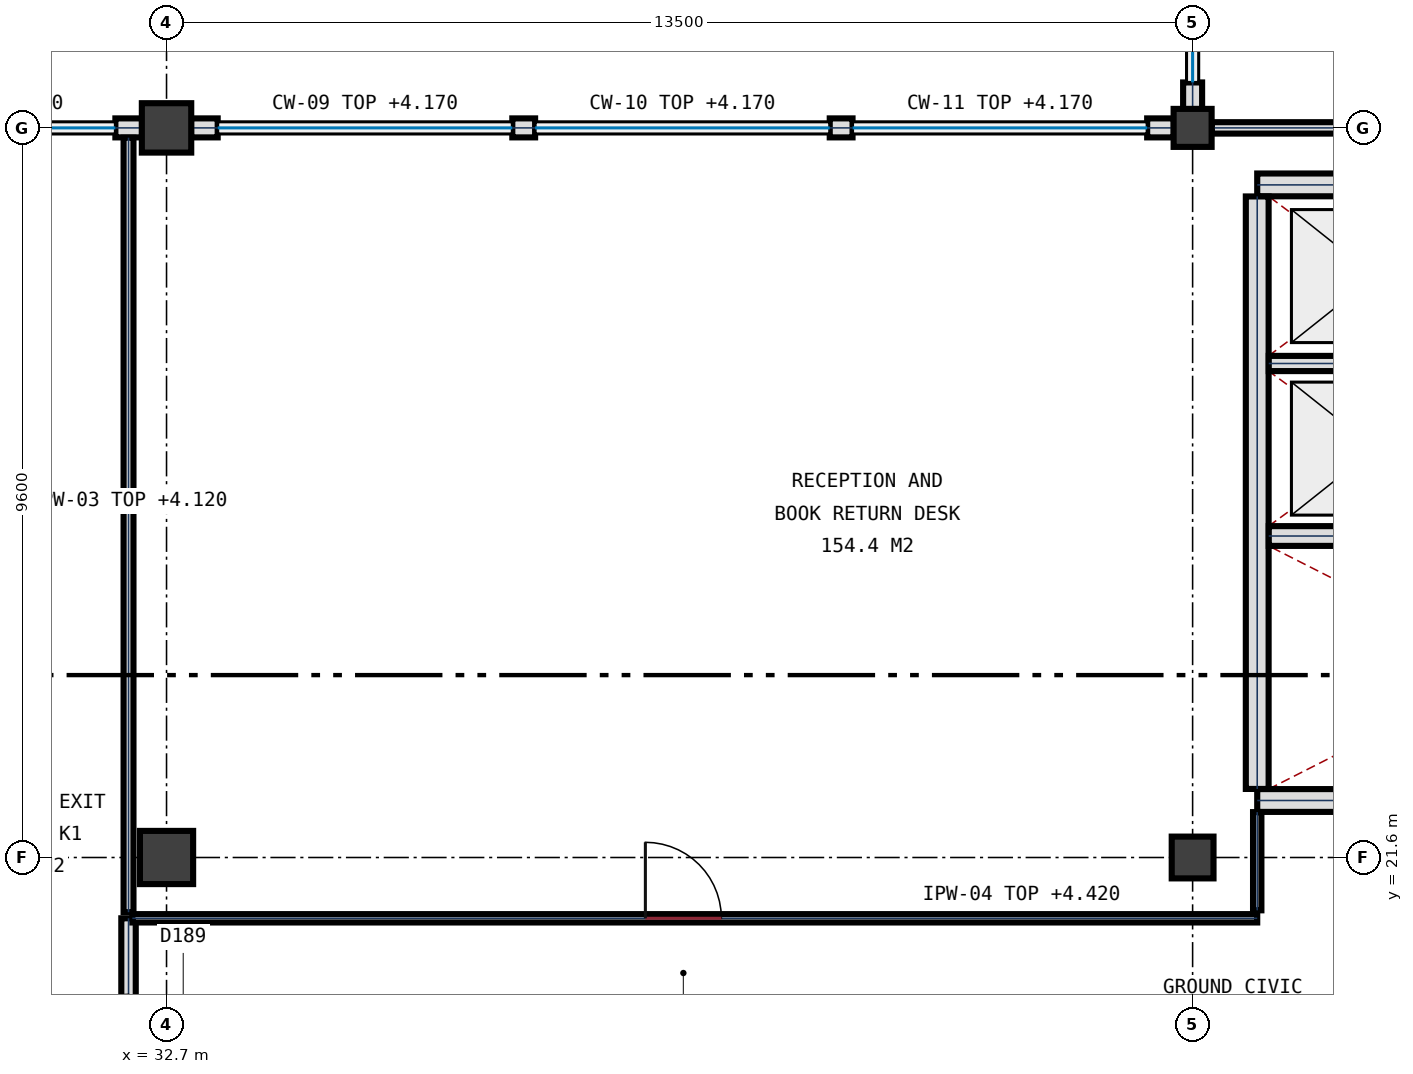
"""IFC4 building model, lengths in metres.
Left out: names, types, materials, properties, quantities, classifications, styles, units other than length and angle.
Written with IfcOpenShell. Run it as: python <this file> out.ifc"""

import sys

from ifc_helpers import new_model, si_unit, direction, frame, frame_2d, origin, origin_2d, place, context, subcontext, project, spatial, rectangle, extrude, element, fill, save


model = new_model("IFC4")
c1 = context("Model", 3, precision=1e-05, world=origin(), true_north=direction((0.0, 1.0)))
c2 = subcontext(c1, "Body", "Model", "MODEL_VIEW")
j1 = project(units=[si_unit("LENGTHUNIT", "METRE"), si_unit("PLANEANGLEUNIT", "RADIAN")], contexts=[c1])
p1 = place(None, origin())
s1 = spatial("IfcSite", under=j1, at=p1, CompositionType="ELEMENT")
p2 = place(p1, origin())
s2 = spatial("IfcBuilding", under=s1, at=p2, CompositionType="ELEMENT")
p3 = place(p2, origin())
s3 = spatial("IfcBuildingStorey", under=s2, at=p3, CompositionType="ELEMENT", Elevation=0.0)
p4 = place(p3, frame((32.7, 21.6, 0.0), z_axis=(0.0, 0.0, 1.0), x_axis=(1.0, 0.0, 0.0)))
e1 = element("IfcColumn", 1, at=p4, inside=s3, PredefinedType="COLUMN", context=c2, shape_type="SweptSolid", body=[
    extrude(rectangle(XDim=0.7, YDim=0.7, at=origin_2d()), origin(), (0.0, 0.0, 1.0), 5.4),
])
p5 = place(p3, frame((32.7, 31.2, 0.0), z_axis=(0.0, 0.0, 1.0), x_axis=(1.0, 0.0, 0.0)))
e2 = element("IfcColumn", 2, at=p5, inside=s3, PredefinedType="COLUMN", context=c2, shape_type="SweptSolid", body=[
    extrude(rectangle(XDim=0.65, YDim=0.65, at=origin_2d()), origin(), (0.0, 0.0, 1.0), 5.4),
])
p6 = place(p3, frame((46.2, 21.6, 0.0), z_axis=(0.0, 0.0, 1.0), x_axis=(1.0, 0.0, 0.0)))
e3 = element("IfcColumn", 3, at=p6, inside=s3, PredefinedType="COLUMN", context=c2, shape_type="SweptSolid", body=[
    extrude(rectangle(XDim=0.55, YDim=0.55, at=origin_2d()), origin(), (0.0, 0.0, 1.0), 5.4),
])
p7 = place(p3, frame((46.2, 31.2, 0.0), z_axis=(0.0, 0.0, 1.0), x_axis=(1.0, 0.0, 0.0)))
e4 = element("IfcColumn", 4, at=p7, inside=s3, PredefinedType="COLUMN", context=c2, shape_type="SweptSolid", body=[
    extrude(rectangle(XDim=0.5, YDim=0.5, at=origin_2d()), origin(), (0.0, 0.0, 1.0), 5.4),
])
p8 = place(p3, frame((32.027, 31.2, 0.0), z_axis=(0.0, 0.0, 1.0), x_axis=(1.0, 0.0, 0.0)))
e5 = element("IfcWall", 5, at=p8, inside=s3, PredefinedType="SOLIDWALL", context=c2, shape_type="SweptSolid", body=[
    extrude(rectangle(XDim=0.35, YDim=0.25, at=frame_2d((0.175, 0.0))), origin(), (0.0, 0.0, 1.0), 4.07),
])
p9 = place(p3, frame((33.023, 31.2, 0.0), z_axis=(0.0, 0.0, 1.0), x_axis=(1.0, 0.0, 0.0)))
e6 = element("IfcWall", 6, at=p9, inside=s3, PredefinedType="SOLIDWALL", context=c2, shape_type="SweptSolid", body=[
    extrude(rectangle(XDim=0.35, YDim=0.25, at=frame_2d((0.175, 0.0))), origin(), (0.0, 0.0, 1.0), 4.17),
])
p10 = place(p3, frame((45.602, 31.2, 0.0), z_axis=(0.0, 0.0, 1.0), x_axis=(1.0, 0.0, 0.0)))
e7 = element("IfcWall", 7, at=p10, inside=s3, PredefinedType="SOLIDWALL", context=c2, shape_type="SweptSolid", body=[
    extrude(rectangle(XDim=0.35, YDim=0.25, at=frame_2d((0.175, 0.0))), origin(), (0.0, 0.0, 1.0), 4.17),
])
p11 = place(p3, frame((37.249, 31.2, 0.0), z_axis=(0.0, 0.0, 1.0), x_axis=(1.0, 0.0, 0.0)))
e8 = element("IfcWall", 8, at=p11, inside=s3, PredefinedType="SOLIDWALL", context=c2, shape_type="SweptSolid", body=[
    extrude(rectangle(XDim=0.3, YDim=0.25, at=frame_2d((0.15, 0.0))), origin(), (0.0, 0.0, 1.0), 4.17),
])
p12 = place(p3, frame((41.426, 31.2, 0.0), z_axis=(0.0, 0.0, 1.0), x_axis=(1.0, 0.0, 0.0)))
e9 = element("IfcWall", 9, at=p12, inside=s3, PredefinedType="SOLIDWALL", context=c2, shape_type="SweptSolid", body=[
    extrude(rectangle(XDim=0.3, YDim=0.25, at=frame_2d((0.15, 0.0))), origin(), (0.0, 0.0, 1.0), 4.17),
])
p13 = place(p3, frame((46.2, 31.448, 0.0), z_axis=(0.0, 0.0, 1.0), x_axis=(0.0, 1.0, 0.0)))
e10 = element("IfcWall", 10, at=p13, inside=s3, PredefinedType="SOLIDWALL", context=c2, shape_type="SweptSolid", body=[
    extrude(rectangle(XDim=0.35, YDim=0.25, at=frame_2d((0.175, 0.0))), origin(), (0.0, 0.0, 1.0), 4.22),
])
for number, where, z_axis, x_axis in (
    (11, (56.55, 22.35, 0.0), (0.0, 0.0, 1.0), (-1.0, 0.0, 0.0)),
    (12, (47.05, 30.45, 0.0), (0.0, 0.0, 1.0), (1.0, 0.0, 0.0)),
):
    element("IfcWall", number, at=place(p3, frame(where, z_axis=z_axis, x_axis=x_axis)), inside=s3, PredefinedType="SHEAR", context=c2, shape_type="SweptSolid", body=[
        extrude(rectangle(XDim=9.5, YDim=0.3, at=frame_2d((4.75, 0.0))), origin(), (0.0, 0.0, 1.0), 5.4),
    ])
p14 = place(p3, frame((47.05, 22.502, 0.0), z_axis=(0.0, 0.0, 1.0), x_axis=(0.0, 1.0, 0.0)))
e13 = element("IfcWall", 13, at=p14, inside=s3, PredefinedType="SHEAR", context=c2, shape_type="SweptSolid", body=[
    extrude(rectangle(XDim=7.796, YDim=0.3, at=frame_2d((3.898, 0.0))), origin(), (0.0, 0.0, 1.0), 5.4),
])
p15 = place(p3, frame((47.202, 25.83, 0.0), z_axis=(0.0, 0.0, 1.0), x_axis=(1.0, 0.0, 0.0)))
e14 = element("IfcWall", 14, at=p15, inside=s3, PredefinedType="SHEAR", context=c2, shape_type="SweptSolid", body=[
    extrude(rectangle(XDim=9.196, YDim=0.26, at=frame_2d((4.598, 0.0))), origin(), (0.0, 0.0, 1.0), 5.4),
])
p16 = place(p15, frame((6.398, 0.0, 0.0)))
e15 = element("IfcOpeningElement", 15, at=p16, cuts=e14, PredefinedType="OPENING", context=c2, shape_type="SweptSolid", body=[
    extrude(rectangle(XDim=1.2, YDim=2.2, at=frame_2d((0.6, 1.1))), frame((0.0, 0.14, 0.0), z_axis=(0.0, -1.0, 0.0), x_axis=(1.0, 0.0, 0.0)), (0.0, 0.0, 1.0), 0.28),
])
p17 = place(p15, frame((8.203, 0.0, 0.0)))
e16 = element("IfcOpeningElement", 16, at=p17, cuts=e14, PredefinedType="OPENING", context=c2, shape_type="SweptSolid", body=[
    extrude(rectangle(XDim=0.85, YDim=2.05, at=frame_2d((0.425, 1.025))), frame((0.0, 0.14, 0.0), z_axis=(0.0, -1.0, 0.0), x_axis=(1.0, 0.0, 0.0)), (0.0, 0.0, 1.0), 0.28),
])
p18 = place(p3, frame((47.202, 28.1, 0.0), z_axis=(0.0, 0.0, 1.0), x_axis=(1.0, 0.0, 0.0)))
e17 = element("IfcWall", 17, at=p18, inside=s3, PredefinedType="PLUMBINGWALL", context=c2, shape_type="SweptSolid", body=[
    extrude(rectangle(XDim=2.796, YDim=0.2, at=frame_2d((1.398, 0.0))), origin(), (0.0, 0.0, 1.0), 5.08),
])
p19 = place(p3, frame((32.2, 17.6, 0.0), z_axis=(0.0, 0.0, 1.0), x_axis=(0.0, 1.0, 0.0)))
e18 = element("IfcWall", 18, at=p19, inside=s3, PredefinedType="PARTITIONING", context=c2, shape_type="SweptSolid", body=[
    extrude(rectangle(XDim=3.2, YDim=0.19, at=frame_2d((1.6, 0.0))), origin(), (0.0, 0.0, 1.0), 5.08),
])
p20 = place(p19, frame((1.0, 0.0, 0.0)))
e19 = element("IfcOpeningElement", 19, at=p20, cuts=e18, PredefinedType="OPENING", context=c2, shape_type="SweptSolid", body=[
    extrude(rectangle(XDim=1.2, YDim=2.2, at=frame_2d((0.6, 1.1))), frame((0.0, 0.105, 0.0), z_axis=(0.0, -1.0, 0.0), x_axis=(1.0, 0.0, 0.0)), (0.0, 0.0, 1.0), 0.21),
])
p21 = place(p3, frame((46.453, 31.2, 0.0), z_axis=(0.0, 0.0, 1.0), x_axis=(1.0, 0.0, 0.0)))
e20 = element("IfcWall", 20, at=p21, inside=s3, PredefinedType="PARTITIONING", context=c2, shape_type="SweptSolid", body=[
    extrude(rectangle(XDim=10.097, YDim=0.15, at=frame_2d((5.049, 0.0))), origin(), (0.0, 0.0, 1.0), 4.22),
])
p22 = place(p3, frame((32.25, 20.8, 0.0), z_axis=(0.0, 0.0, 1.0), x_axis=(1.0, 0.0, 0.0)))
e21 = element("IfcWall", 21, at=p22, inside=s3, PredefinedType="PARTITIONING", context=c2, shape_type="SweptSolid", body=[
    extrude(rectangle(XDim=14.8, YDim=0.11, at=frame_2d((7.4, 0.0))), origin(), (0.0, 0.0, 1.0), 4.42),
])
p23 = place(p22, frame((6.75, 0.0, 0.0)))
e22 = element("IfcOpeningElement", 22, at=p23, cuts=e21, PredefinedType="OPENING", context=c2, shape_type="SweptSolid", body=[
    extrude(rectangle(XDim=1.0, YDim=2.2, at=frame_2d((0.5, 1.1))), frame((0.0, 0.065, 0.0), z_axis=(0.0, -1.0, 0.0), x_axis=(1.0, 0.0, 0.0)), (0.0, 0.0, 1.0), 0.13),
])
p24 = place(p3, frame((32.2, 20.88, 0.0), z_axis=(0.0, 0.0, 1.0), x_axis=(0.0, 1.0, 0.0)))
e23 = element("IfcWall", 23, at=p24, inside=s3, PredefinedType="PARTITIONING", context=c2, shape_type="SweptSolid", body=[
    extrude(rectangle(XDim=10.191, YDim=0.13, at=frame_2d((5.096, 0.0))), origin(), (0.0, 0.0, 1.0), 4.12),
])
p25 = place(p3, frame((47.05, 20.905, 0.0), z_axis=(0.0, 0.0, 1.0), x_axis=(0.0, 1.0, 0.0)))
e24 = element("IfcWall", 24, at=p25, inside=s3, PredefinedType="PARTITIONING", context=c2, shape_type="SweptSolid", body=[
    extrude(rectangle(XDim=1.292, YDim=0.11, at=frame_2d((0.646, 0.0))), origin(), (0.0, 0.0, 1.0), 4.22),
])
p26 = place(p23, origin())
e25 = element("IfcDoor", 25, at=p26, inside=s3, OperationType="SINGLE_SWING_LEFT", PredefinedType="DOOR", context=c2, shape_type="SweptSolid", body=[
    extrude(rectangle(XDim=1.0, YDim=2.2, at=frame_2d((0.5, 1.1))), frame((0.0, 0.032, 0.0), z_axis=(0.0, -1.0, 0.0), x_axis=(1.0, 0.0, 0.0)), (0.0, 0.0, 1.0), 0.065),
])
fill(e22, e25)
p27 = place(p20, origin())
e26 = element("IfcDoor", 26, at=p27, inside=s3, OperationType="SINGLE_SWING_LEFT", PredefinedType="DOOR", context=c2, shape_type="SweptSolid", body=[
    extrude(rectangle(XDim=1.2, YDim=2.2, at=frame_2d((0.6, 1.1))), frame((0.0, 0.032, 0.0), z_axis=(0.0, -1.0, 0.0), x_axis=(1.0, 0.0, 0.0)), (0.0, 0.0, 1.0), 0.065),
])
fill(e19, e26)
save(model, sys.argv[1])
